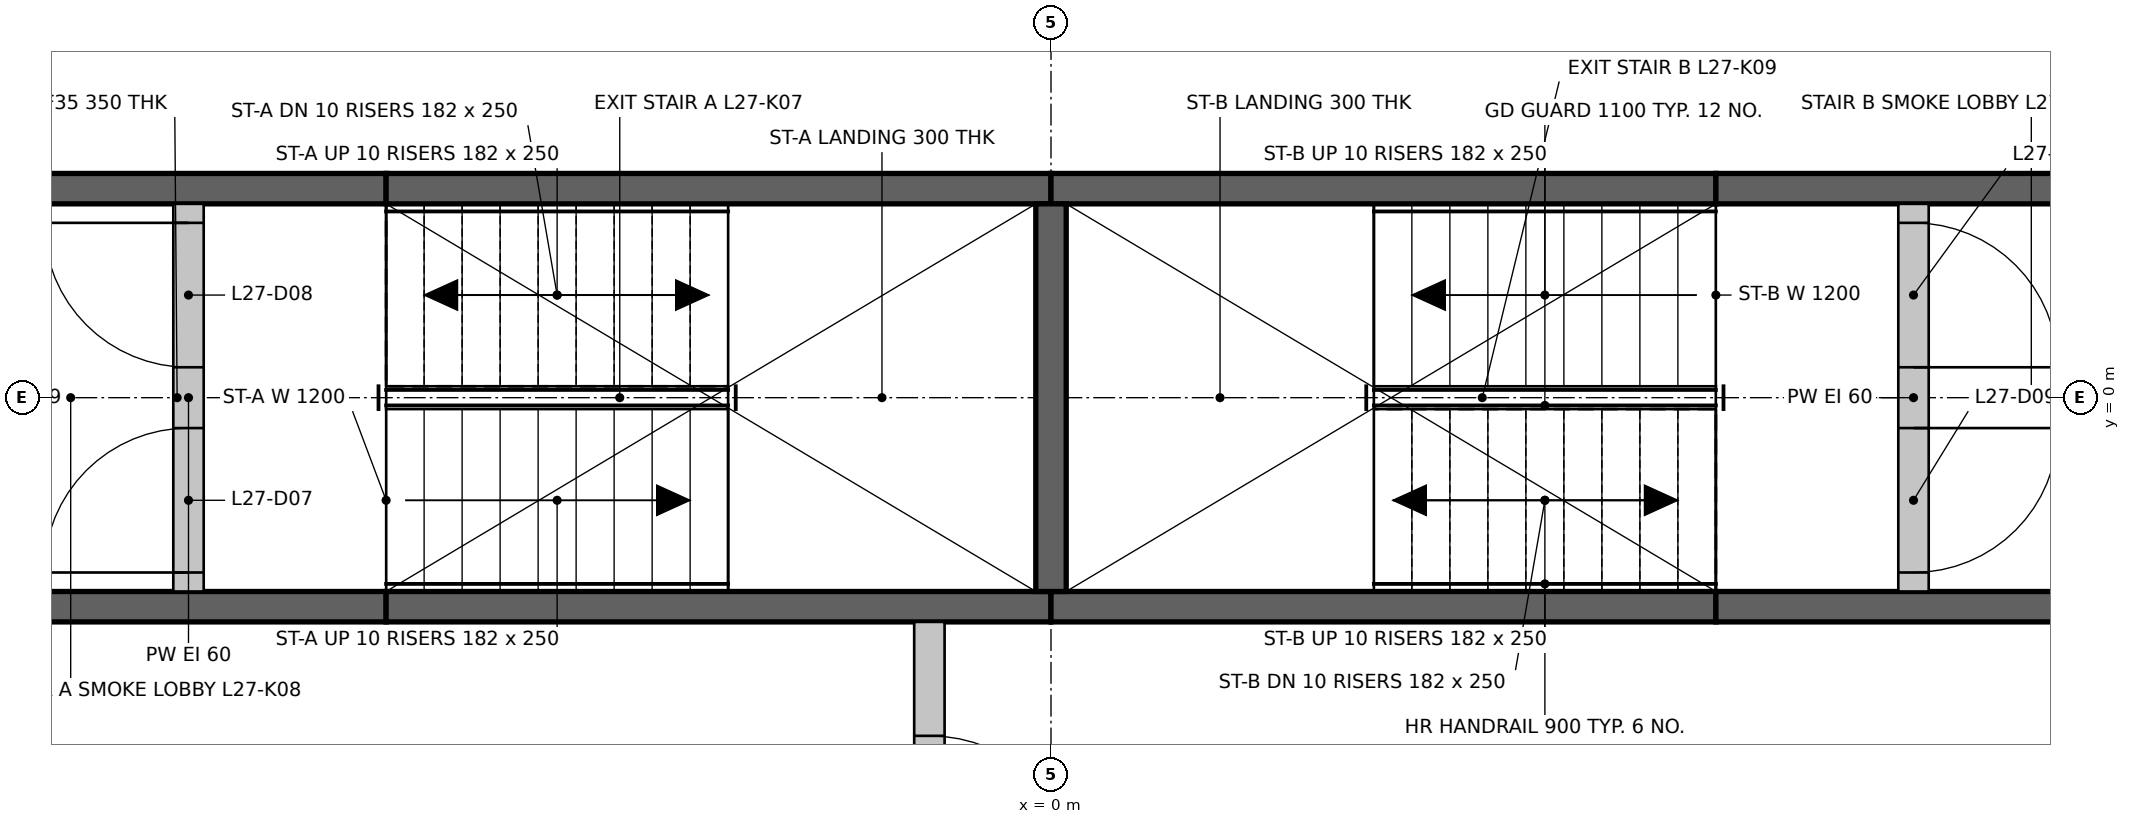
"""IFC4 building model, lengths in metres.
Left out: names, types, materials, properties, quantities, classifications, styles, units other than length and angle.
Written with IfcOpenShell. Run it as: python <this file> out.ifc"""

import sys

from ifc_helpers import new_model, si_unit, direction, frame, frame_2d, origin, place, context, subcontext, project, spatial, rectangle, extrude, element, fill, save


model = new_model("IFC4")
c1 = context("Model", 3, precision=1e-05, world=origin(), true_north=direction((0.0, 1.0)))
c2 = subcontext(c1, "Body", "Model", "MODEL_VIEW")
j1 = project(units=[si_unit("LENGTHUNIT", "METRE"), si_unit("PLANEANGLEUNIT", "RADIAN")], contexts=[c1])
p1 = place(None, origin())
s1 = spatial("IfcSite", under=j1, at=p1, CompositionType="ELEMENT")
p2 = place(p1, origin())
s2 = spatial("IfcBuilding", under=s1, at=p2, CompositionType="ELEMENT")
p3 = place(p2, frame((0.0, 0.0, 109.25)))
s3 = spatial("IfcBuildingStorey", under=s2, at=p3, CompositionType="ELEMENT", Elevation=109.25)
p4 = place(p3, frame((-7.124, -1.375, 0.0), z_axis=(0.0, 0.0, 1.0), x_axis=(1.0, 0.0, 0.0)))
e1 = element("IfcWall", 1, at=p4, inside=s3, PredefinedType="SHEAR", context=c2, shape_type="SweptSolid", body=[
    extrude(rectangle(XDim=2.75, YDim=0.2, at=frame_2d((1.375, 0.0))), origin(), (0.0, 0.0, 1.0), 3.3),
])
for number, where, z_axis, x_axis in (
    (2, (-4.374, -1.375, 0.0), (0.0, 0.0, 1.0), (1.0, 0.0, 0.0)),
    (3, (0.0, -1.375, 0.0), (0.0, 0.0, 1.0), (1.0, 0.0, 0.0)),
):
    element("IfcWall", number, at=place(p3, frame(where, z_axis=z_axis, x_axis=x_axis)), inside=s3, PredefinedType="SHEAR", context=c2, shape_type="SweptSolid", body=[
        extrude(rectangle(XDim=4.374, YDim=0.2, at=frame_2d((2.187, 0.0))), origin(), (0.0, 0.0, 1.0), 3.3),
    ])
for number, where, z_axis, x_axis in (
    (4, (4.374, -1.375, 0.0), (0.0, 0.0, 1.0), (1.0, 0.0, 0.0)),
    (5, (-7.124, 1.375, 0.0), (0.0, 0.0, 1.0), (1.0, 0.0, 0.0)),
):
    element("IfcWall", number, at=place(p3, frame(where, z_axis=z_axis, x_axis=x_axis)), inside=s3, PredefinedType="SHEAR", context=c2, shape_type="SweptSolid", body=[
        extrude(rectangle(XDim=2.75, YDim=0.2, at=frame_2d((1.375, 0.0))), origin(), (0.0, 0.0, 1.0), 3.3),
    ])
for number, where, z_axis, x_axis in (
    (6, (-4.374, 1.375, 0.0), (0.0, 0.0, 1.0), (1.0, 0.0, 0.0)),
    (7, (0.0, 1.375, 0.0), (0.0, 0.0, 1.0), (1.0, 0.0, 0.0)),
):
    element("IfcWall", number, at=place(p3, frame(where, z_axis=z_axis, x_axis=x_axis)), inside=s3, PredefinedType="SHEAR", context=c2, shape_type="SweptSolid", body=[
        extrude(rectangle(XDim=4.374, YDim=0.2, at=frame_2d((2.187, 0.0))), origin(), (0.0, 0.0, 1.0), 3.3),
    ])
p5 = place(p3, frame((4.374, 1.375, 0.0), z_axis=(0.0, 0.0, 1.0), x_axis=(1.0, 0.0, 0.0)))
e8 = element("IfcWall", 8, at=p5, inside=s3, PredefinedType="SHEAR", context=c2, shape_type="SweptSolid", body=[
    extrude(rectangle(XDim=2.75, YDim=0.2, at=frame_2d((1.375, 0.0))), origin(), (0.0, 0.0, 1.0), 3.3),
])
p6 = place(p3, frame((0.0, -1.275, 0.0), z_axis=(0.0, 0.0, 1.0), x_axis=(0.0, 1.0, 0.0)))
e9 = element("IfcWall", 9, at=p6, inside=s3, PredefinedType="SHEAR", context=c2, shape_type="SweptSolid", body=[
    extrude(rectangle(XDim=2.55, YDim=0.2, at=frame_2d((1.275, 0.0))), origin(), (0.0, 0.0, 1.0), 3.3),
])
p7 = place(p3, frame((-0.8, -3.974, 0.0), z_axis=(0.0, 0.0, 1.0), x_axis=(0.0, 1.0, 0.0)))
e10 = element("IfcWall", 10, at=p7, inside=s3, PredefinedType="PARTITIONING", context=c2, shape_type="SweptSolid", body=[
    extrude(rectangle(XDim=2.499, YDim=0.2, at=frame_2d((1.25, 0.0))), origin(), (0.0, 0.0, 1.0), 3.3),
])
p8 = place(p7, frame((0.75, 0.0, 0.0)))
e11 = element("IfcOpeningElement", 11, at=p8, cuts=e10, PredefinedType="OPENING", context=c2, shape_type="SweptSolid", body=[
    extrude(rectangle(XDim=1.0, YDim=2.1, at=frame_2d((0.5, 1.05))), frame((0.0, 0.11, 0.0), z_axis=(0.0, -1.0, 0.0), x_axis=(1.0, 0.0, 0.0)), (0.0, 0.0, 1.0), 0.22),
])
p9 = place(p3, frame((-5.674, -1.275, 0.0), z_axis=(0.0, 0.0, 1.0), x_axis=(0.0, 1.0, 0.0)))
e12 = element("IfcWall", 12, at=p9, inside=s3, PredefinedType="PARTITIONING", context=c2, shape_type="SweptSolid", body=[
    extrude(rectangle(XDim=2.55, YDim=0.2, at=frame_2d((1.275, 0.0))), origin(), (0.0, 0.0, 1.0), 3.3),
])
p10 = place(p9, frame((0.125, 0.0, 0.0)))
e13 = element("IfcOpeningElement", 13, at=p10, cuts=e12, PredefinedType="OPENING", context=c2, shape_type="SweptSolid", body=[
    extrude(rectangle(XDim=0.95, YDim=2.1, at=frame_2d((0.475, 1.05))), frame((0.0, 0.11, 0.0), z_axis=(0.0, -1.0, 0.0), x_axis=(1.0, 0.0, 0.0)), (0.0, 0.0, 1.0), 0.22),
])
p11 = place(p9, frame((1.475, 0.0, 0.0)))
e14 = element("IfcOpeningElement", 14, at=p11, cuts=e12, PredefinedType="OPENING", context=c2, shape_type="SweptSolid", body=[
    extrude(rectangle(XDim=0.95, YDim=2.1, at=frame_2d((0.475, 1.05))), frame((0.0, 0.11, 0.0), z_axis=(0.0, -1.0, 0.0), x_axis=(1.0, 0.0, 0.0)), (0.0, 0.0, 1.0), 0.22),
])
p12 = place(p3, frame((5.674, -1.275, 0.0), z_axis=(0.0, 0.0, 1.0), x_axis=(0.0, 1.0, 0.0)))
e15 = element("IfcWall", 15, at=p12, inside=s3, PredefinedType="PARTITIONING", context=c2, shape_type="SweptSolid", body=[
    extrude(rectangle(XDim=2.55, YDim=0.2, at=frame_2d((1.275, 0.0))), origin(), (0.0, 0.0, 1.0), 3.3),
])
p13 = place(p12, frame((0.125, 0.0, 0.0)))
e16 = element("IfcOpeningElement", 16, at=p13, cuts=e15, PredefinedType="OPENING", context=c2, shape_type="SweptSolid", body=[
    extrude(rectangle(XDim=0.95, YDim=2.1, at=frame_2d((0.475, 1.05))), frame((0.0, 0.11, 0.0), z_axis=(0.0, -1.0, 0.0), x_axis=(1.0, 0.0, 0.0)), (0.0, 0.0, 1.0), 0.22),
])
p14 = place(p12, frame((1.475, 0.0, 0.0)))
e17 = element("IfcOpeningElement", 17, at=p14, cuts=e15, PredefinedType="OPENING", context=c2, shape_type="SweptSolid", body=[
    extrude(rectangle(XDim=0.95, YDim=2.1, at=frame_2d((0.475, 1.05))), frame((0.0, 0.11, 0.0), z_axis=(0.0, -1.0, 0.0), x_axis=(1.0, 0.0, 0.0)), (0.0, 0.0, 1.0), 0.22),
])
p15 = place(p10, origin())
e18 = element("IfcDoor", 18, at=p15, inside=s3, OperationType="SINGLE_SWING_LEFT", PredefinedType="DOOR", context=c2, shape_type="SweptSolid", body=[
    extrude(rectangle(XDim=0.95, YDim=2.1, at=frame_2d((0.475, 1.05))), frame((0.0, 0.025, 0.0), z_axis=(0.0, -1.0, 0.0), x_axis=(1.0, 0.0, 0.0)), (0.0, 0.0, 1.0), 0.05),
])
fill(e13, e18)
p16 = place(p11, origin())
e19 = element("IfcDoor", 19, at=p16, inside=s3, OperationType="SINGLE_SWING_RIGHT", PredefinedType="DOOR", context=c2, shape_type="SweptSolid", body=[
    extrude(rectangle(XDim=0.95, YDim=2.1, at=frame_2d((0.475, 1.05))), frame((0.0, 0.025, 0.0), z_axis=(0.0, -1.0, 0.0), x_axis=(1.0, 0.0, 0.0)), (0.0, 0.0, 1.0), 0.05),
])
fill(e14, e19)
p17 = place(p13, frame((0.95, 0.0, 0.0), z_axis=(0.0, 0.0, 1.0), x_axis=(-1.0, 0.0, 0.0)))
e20 = element("IfcDoor", 20, at=p17, inside=s3, OperationType="SINGLE_SWING_RIGHT", PredefinedType="DOOR", context=c2, shape_type="SweptSolid", body=[
    extrude(rectangle(XDim=0.95, YDim=2.1, at=frame_2d((0.475, 1.05))), frame((0.0, 0.025, 0.0), z_axis=(0.0, -1.0, 0.0), x_axis=(1.0, 0.0, 0.0)), (0.0, 0.0, 1.0), 0.05),
])
fill(e16, e20)
p18 = place(p14, frame((0.95, 0.0, 0.0), z_axis=(0.0, 0.0, 1.0), x_axis=(-1.0, 0.0, 0.0)))
e21 = element("IfcDoor", 21, at=p18, inside=s3, OperationType="SINGLE_SWING_LEFT", PredefinedType="DOOR", context=c2, shape_type="SweptSolid", body=[
    extrude(rectangle(XDim=0.95, YDim=2.1, at=frame_2d((0.475, 1.05))), frame((0.0, 0.025, 0.0), z_axis=(0.0, -1.0, 0.0), x_axis=(1.0, 0.0, 0.0)), (0.0, 0.0, 1.0), 0.05),
])
fill(e17, e21)
p19 = place(p8, frame((1.0, 0.0, 0.0), z_axis=(0.0, 0.0, 1.0), x_axis=(-1.0, 0.0, 0.0)))
e22 = element("IfcDoor", 22, at=p19, inside=s3, OperationType="SINGLE_SWING_LEFT", PredefinedType="DOOR", context=c2, shape_type="SweptSolid", body=[
    extrude(rectangle(XDim=1.0, YDim=2.1, at=frame_2d((0.5, 1.05))), frame((0.0, 0.025, 0.0), z_axis=(0.0, -1.0, 0.0), x_axis=(1.0, 0.0, 0.0)), (0.0, 0.0, 1.0), 0.05),
])
fill(e11, e22)
save(model, sys.argv[1])
